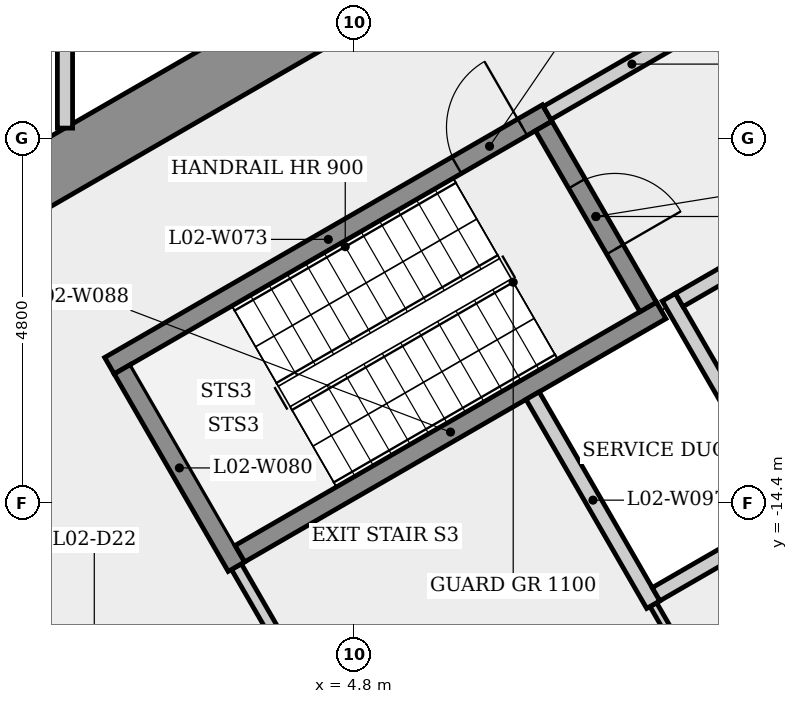
"""IFC4 building model, lengths in metres.
Left out: names, types, materials, properties, quantities, classifications, styles, units other than length and angle.
Written with IfcOpenShell. Run it as: python <this file> out.ifc"""

import sys

from ifc_helpers import new_model, si_unit, direction, frame, frame_2d, origin, place, context, subcontext, project, spatial, rectangle, extrude, element, fill, save


model = new_model("IFC4")
c1 = context("Model", 3, precision=1e-05, world=origin(), true_north=direction((0.0, 1.0)))
c2 = subcontext(c1, "Body", "Model", "MODEL_VIEW")
j1 = project(units=[si_unit("LENGTHUNIT", "METRE"), si_unit("PLANEANGLEUNIT", "RADIAN")], contexts=[c1])
p1 = place(None, origin())
s1 = spatial("IfcSite", under=j1, at=p1, CompositionType="ELEMENT")
p2 = place(p1, origin())
s2 = spatial("IfcBuilding", under=s1, at=p2, CompositionType="ELEMENT")
p3 = place(p2, frame((0.0, 0.0, 11.5)))
s3 = spatial("IfcBuildingStorey", under=s2, at=p3, CompositionType="ELEMENT", Elevation=11.5)
p4 = place(p3, frame((-0.2, -10.623, 0.0), z_axis=(0.0, 0.0, 1.0), x_axis=(0.866023993627, 0.500002442456, 0.0)))
e1 = element("IfcWall", 1, at=p4, inside=s3, PredefinedType="SHEAR", context=c2, shape_type="SweptSolid", body=[
    extrude(rectangle(XDim=10.97, YDim=0.8, at=frame_2d((5.485, 0.0))), origin(), (0.0, 0.0, 1.0), 4.5),
])
p5 = place(p4, frame((7.224, 0.0, 0.0)))
e2 = element("IfcOpeningElement", 2, at=p5, cuts=e1, PredefinedType="OPENING", context=c2, shape_type="SweptSolid", body=[
    extrude(rectangle(XDim=0.9, YDim=2.1, at=frame_2d((0.45, 1.05))), frame((0.0, 0.41, 0.0), z_axis=(0.0, -1.0, 0.0), x_axis=(1.0, 0.0, 0.0)), (0.0, 0.0, 1.0), 0.82),
])
p6 = place(p3, frame((1.0, -5.275, 0.0), z_axis=(0.0, 0.0, 1.0), x_axis=(0.0, -1.0, 0.0)))
e3 = element("IfcWall", 3, at=p6, inside=s3, PredefinedType="PARTITIONING", context=c2, shape_type="SweptSolid", body=[
    extrude(rectangle(XDim=4.194, YDim=0.2, at=frame_2d((2.097, 0.0))), origin(), (0.0, 0.0, 1.0), 4.1),
])
p7 = place(p3, frame((1.585, -12.595, 0.0), z_axis=(0.0, 0.0, 1.0), x_axis=(0.866036417653, 0.499980922934, 0.0)))
e4 = element("IfcWall", 4, at=p7, inside=s3, PredefinedType="SHEAR", context=c2, shape_type="SweptSolid", body=[
    extrude(rectangle(XDim=6.65, YDim=0.25, at=frame_2d((3.325, 0.0))), origin(), (0.0, 0.0, 1.0), 4.1),
])
p8 = place(p7, frame((5.275, 0.0, 0.0)))
e5 = element("IfcOpeningElement", 5, at=p8, cuts=e4, PredefinedType="OPENING", context=c2, shape_type="SweptSolid", body=[
    extrude(rectangle(XDim=1.0, YDim=2.1, at=frame_2d((0.5, 1.05))), frame((0.0, 0.135, 0.0), z_axis=(0.0, -1.0, 0.0), x_axis=(1.0, 0.0, 0.0)), (0.0, 0.0, 1.0), 0.27),
])
p9 = place(p3, frame((3.256, -15.239, 0.0), z_axis=(0.0, 0.0, 1.0), x_axis=(0.499974444137, -0.866040157966, 0.0)))
e6 = element("IfcWall", 6, at=p9, inside=s3, PredefinedType="PARTITIONING", context=c2, shape_type="SweptSolid", body=[
    extrude(rectangle(XDim=1.342, YDim=0.15, at=frame_2d((0.671, 0.0))), origin(), (0.0, 0.0, 1.0), 4.1),
])
p10 = place(p3, frame((3.256, -15.239, 0.0), z_axis=(0.0, 0.0, 1.0), x_axis=(-0.50002537861, 0.866010750942, 0.0)))
e7 = element("IfcWall", 7, at=p10, inside=s3, PredefinedType="SHEAR", context=c2, shape_type="SweptSolid", body=[
    extrude(rectangle(XDim=3.0, YDim=0.25, at=frame_2d((1.5, 0.0))), origin(), (0.0, 0.0, 1.0), 4.1),
])
p11 = place(p3, frame((3.301, -15.068, 0.0), z_axis=(0.0, 0.0, 1.0), x_axis=(0.866035036182, 0.499983315828, 0.0)))
e8 = element("IfcWall", 8, at=p11, inside=s3, PredefinedType="SHEAR", context=c2, shape_type="SweptSolid", body=[
    extrude(rectangle(XDim=6.4, YDim=0.25, at=frame_2d((3.2, 0.0))), origin(), (0.0, 0.0, 1.0), 4.1),
])
p12 = place(p3, frame((7.298, -9.441, 0.0), z_axis=(0.0, 0.0, 1.0), x_axis=(0.500034990121, -0.866005201286, 0.0)))
e9 = element("IfcWall", 9, at=p12, inside=s3, PredefinedType="SHEAR", context=c2, shape_type="SweptSolid", body=[
    extrude(rectangle(XDim=2.75, YDim=0.25, at=frame_2d((1.375, 0.0))), origin(), (0.0, 0.0, 1.0), 4.1),
])
p13 = place(p12, frame((0.875, 0.0, 0.0)))
e10 = element("IfcOpeningElement", 10, at=p13, cuts=e9, PredefinedType="OPENING", context=c2, shape_type="SweptSolid", body=[
    extrude(rectangle(XDim=1.0, YDim=2.1, at=frame_2d((0.5, 1.05))), frame((0.0, 0.135, 0.0), z_axis=(0.0, -1.0, 0.0), x_axis=(1.0, 0.0, 0.0)), (0.0, 0.0, 1.0), 0.27),
])
p14 = place(p3, frame((7.344, -9.27, 0.0), z_axis=(0.0, 0.0, 1.0), x_axis=(0.866005588531, 0.500034319456, 0.0)))
e11 = element("IfcWall", 11, at=p14, inside=s3, PredefinedType="PARTITIONING", context=c2, shape_type="SweptSolid", body=[
    extrude(rectangle(XDim=2.575, YDim=0.2, at=frame_2d((1.288, 0.0))), origin(), (0.0, 0.0, 1.0), 4.1),
])
p15 = place(p3, frame((8.74, -15.738, 0.0), z_axis=(0.0, 0.0, 1.0), x_axis=(0.500026738915, -0.866009965514, 0.0)))
e12 = element("IfcWall", 12, at=p15, inside=s3, PredefinedType="PARTITIONING", context=c2, shape_type="SweptSolid", body=[
    extrude(rectangle(XDim=3.681, YDim=0.1, at=frame_2d((1.84, 0.0))), origin(), (0.0, 0.0, 1.0), 4.1),
])
p16 = place(p3, frame((8.74, -15.739, 0.0), z_axis=(0.0, 0.0, 1.0), x_axis=(-0.500017526161, 0.866015284814, 0.0)))
e13 = element("IfcWall", 13, at=p16, inside=s3, PredefinedType="PLUMBINGWALL", context=c2, shape_type="SweptSolid", body=[
    extrude(rectangle(XDim=3.175, YDim=0.2, at=frame_2d((1.588, 0.0))), origin(), (0.0, 0.0, 1.0), 4.1),
])
p17 = place(p3, frame((8.945, -11.694, 0.0), z_axis=(0.0, 0.0, 1.0), x_axis=(0.500062241894, -0.865989465428, 0.0)))
e14 = element("IfcWall", 14, at=p17, inside=s3, PredefinedType="PLUMBINGWALL", context=c2, shape_type="SweptSolid", body=[
    extrude(rectangle(XDim=3.4, YDim=0.2, at=frame_2d((1.7, 0.0))), origin(), (0.0, 0.0, 1.0), 4.1),
])
p18 = place(p3, frame((9.537, -8.119, 0.0), z_axis=(0.0, 0.0, 1.0), x_axis=(0.499990139034, -0.866031096941, 0.0)))
e15 = element("IfcWall", 15, at=p18, inside=s3, PredefinedType="PARTITIONING", context=c2, shape_type="SweptSolid", body=[
    extrude(rectangle(XDim=3.0, YDim=0.2, at=frame_2d((1.5, 0.0))), origin(), (0.0, 0.0, 1.0), 4.1),
])
p19 = place(p18, frame((0.935, 0.0, 0.0)))
e16 = element("IfcOpeningElement", 16, at=p19, cuts=e15, PredefinedType="OPENING", context=c2, shape_type="SweptSolid", body=[
    extrude(rectangle(XDim=1.0, YDim=2.1, at=frame_2d((0.5, 1.05))), frame((0.0, 0.11, 0.0), z_axis=(0.0, -1.0, 0.0), x_axis=(1.0, 0.0, 0.0)), (0.0, 0.0, 1.0), 0.22),
])
p20 = place(p3, frame((10.509, -14.602, 0.0), z_axis=(0.0, 0.0, 1.0), x_axis=(-0.866010750942, -0.50002537861, 0.0)))
e17 = element("IfcWall", 17, at=p20, inside=s3, PredefinedType="PLUMBINGWALL", context=c2, shape_type="SweptSolid", body=[
    extrude(rectangle(XDim=2.0, YDim=0.2, at=frame_2d((1.0, 0.0))), origin(), (0.0, 0.0, 1.0), 4.1),
])
p21 = place(p3, frame((10.901, -10.681, 0.0), z_axis=(0.0, 0.0, 1.0), x_axis=(-0.866009402589, -0.500027713859, 0.0)))
e18 = element("IfcWall", 18, at=p21, inside=s3, PredefinedType="PARTITIONING", context=c2, shape_type="SweptSolid", body=[
    extrude(rectangle(XDim=2.1, YDim=0.2, at=frame_2d((1.05, 0.0))), origin(), (0.0, 0.0, 1.0), 4.1),
])
p22 = place(p8, origin())
e19 = element("IfcDoor", 19, at=p22, inside=s3, OperationType="SINGLE_SWING_RIGHT", PredefinedType="DOOR", context=c2, shape_type="SweptSolid", body=[
    extrude(rectangle(XDim=1.0, YDim=2.1, at=frame_2d((0.5, 1.05))), frame((0.0, 0.025, 0.0), z_axis=(0.0, -1.0, 0.0), x_axis=(1.0, 0.0, 0.0)), (0.0, 0.0, 1.0), 0.05),
])
fill(e5, e19)
p23 = place(p13, origin())
e20 = element("IfcDoor", 20, at=p23, inside=s3, OperationType="SINGLE_SWING_RIGHT", PredefinedType="DOOR", context=c2, shape_type="SweptSolid", body=[
    extrude(rectangle(XDim=1.0, YDim=2.1, at=frame_2d((0.5, 1.05))), frame((0.0, 0.025, 0.0), z_axis=(0.0, -1.0, 0.0), x_axis=(1.0, 0.0, 0.0)), (0.0, 0.0, 1.0), 0.05),
])
fill(e10, e20)
save(model, sys.argv[1])
